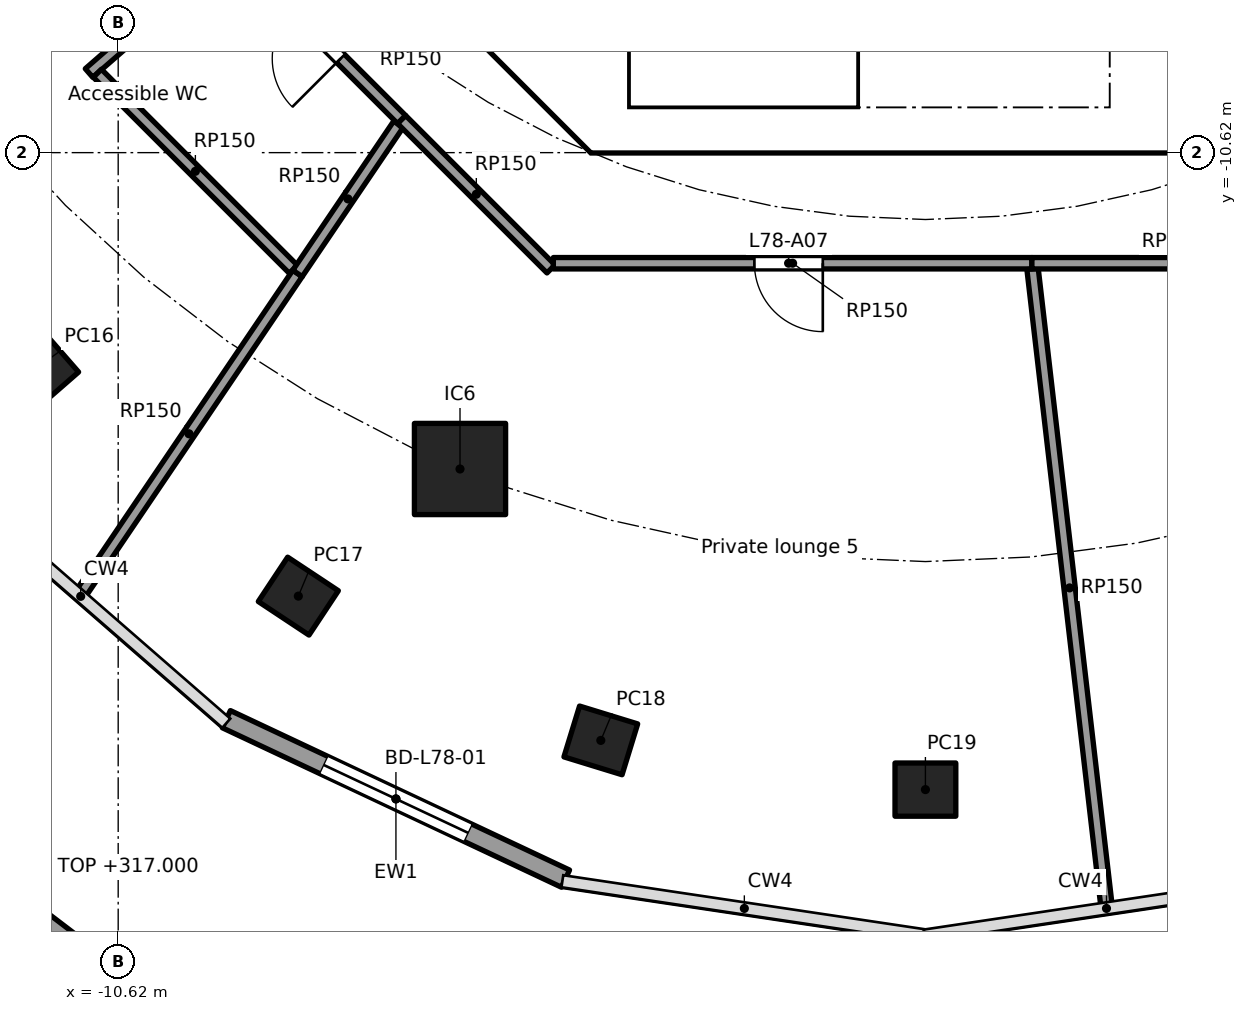
"""IFC4 building model, lengths in metres.
Left out: names, types, materials, properties, quantities, classifications, styles, units other than length and angle.
Written with IfcOpenShell. Run it as: python <this file> out.ifc"""

import sys

from ifc_helpers import new_model, si_unit, direction, frame, frame_2d, origin, origin_2d, place, context, subcontext, project, spatial, polyline, rectangle, hollow_rectangle, outline, extrude, element, fill, save


model = new_model("IFC4")
c1 = context("Model", 3, precision=1e-05, world=origin(), true_north=direction((0.0, 1.0)))
c2 = subcontext(c1, "Body", "Model", "MODEL_VIEW")
j1 = project(units=[si_unit("LENGTHUNIT", "METRE"), si_unit("PLANEANGLEUNIT", "RADIAN")], contexts=[c1])
p1 = place(None, origin())
s1 = spatial("IfcSite", under=j1, at=p1, CompositionType="ELEMENT")
p2 = place(p1, origin())
s2 = spatial("IfcBuilding", under=s1, at=p2, CompositionType="ELEMENT")
p3 = place(p2, frame((0.0, 0.0, 315.9)))
s3 = spatial("IfcBuildingStorey", under=s2, at=p3, CompositionType="ELEMENT", Elevation=315.9)
for number, where, z_axis, x_axis in (
    (1, (-11.667, -13.435, -0.3), (0.0, 0.0, 1.0), (0.657, -0.754, 0.0)),
    (2, (-8.25, -16.455, -0.3), (0.0, 0.0, 1.0), (0.834, -0.552, 0.0)),
    (3, (-4.271, -18.353, -0.3), (0.0, 0.0, 1.0), (0.956, -0.294, 0.0)),
    (4, (0.0, -19.0, -0.3), (0.0, 0.0, 1.0), (1.0, 0.0, 0.0)),
):
    element("IfcColumn", number, at=place(p3, frame(where, z_axis=z_axis, x_axis=x_axis)), inside=s3, PredefinedType="COLUMN", context=c2, shape_type="SweptSolid", body=[
        extrude(hollow_rectangle(XDim=0.8, YDim=0.7, WallThickness=0.025, at=origin_2d()), origin(), (0.0, 0.0, 1.0), 4.8),
    ])
p4 = place(p3, frame((-6.123, -14.782, 0.0), z_axis=(0.0, 0.0, 1.0), x_axis=(1.0, 0.0, 0.0)))
e5 = element("IfcColumn", 5, at=p4, inside=s3, PredefinedType="COLUMN", context=c2, shape_type="SweptSolid", body=[
    extrude(rectangle(XDim=1.2, YDim=1.2, at=origin_2d()), origin(), (0.0, 0.0, 1.0), 4.5),
])
p5 = place(p3, frame((-4.735, -20.171, 0.0), z_axis=(0.0, 0.0, 1.0), x_axis=(-0.904961168887, 0.425494163069, 0.0)))
e6 = element("IfcWall", 6, at=p5, inside=s3, PredefinedType="SOLIDWALL", context=c2, shape_type="SweptSolid", body=[
    extrude(rectangle(XDim=4.93, YDim=0.25, at=frame_2d((2.465, 0.0))), origin(), (0.0, 0.0, 1.0), 4.2),
])
p6 = place(p5, frame((1.415, 0.0, 0.0)))
e7 = element("IfcOpeningElement", 7, at=p6, cuts=e6, PredefinedType="OPENING", context=c2, shape_type="SweptSolid", body=[
    extrude(rectangle(XDim=2.1, YDim=2.4, at=frame_2d((1.05, 1.2))), frame((0.0, 0.135, 0.0), z_axis=(0.0, -1.0, 0.0), x_axis=(1.0, 0.0, 0.0)), (0.0, 0.0, 1.0), 0.27),
])
p7 = place(p3, frame((-9.073, -23.515, 0.0), z_axis=(0.0, 0.0, 1.0), x_axis=(-0.795536400327, 0.605905797756, 0.0)))
e8 = element("IfcWall", 8, at=p7, inside=s3, PredefinedType="SOLIDWALL", context=c2, shape_type="SweptSolid", body=[
    extrude(rectangle(XDim=7.387, YDim=1.6, at=frame_2d((3.694, 0.0))), origin(), (0.0, 0.0, 1.0), 1.1),
])
p8 = place(p3, frame((-9.988, -4.613, 0.0), z_axis=(0.0, 0.0, 1.0), x_axis=(0.707106781187, -0.707106781187, 0.0)))
e9 = element("IfcWall", 9, at=p8, inside=s3, PredefinedType="SHEAR", context=c2, shape_type="SweptSolid", body=[
    extrude(rectangle(XDim=7.602, YDim=0.6, at=frame_2d((3.801, 0.0))), origin(), (0.0, 0.0, 1.0), 4.2),
])
p9 = place(p8, frame((6.151, 0.0, 0.0)))
e10 = element("IfcOpeningElement", 10, at=p9, cuts=e9, PredefinedType="OPENING", context=c2, shape_type="SweptSolid", body=[
    extrude(rectangle(XDim=1.1, YDim=2.1, at=frame_2d((0.55, 1.05))), frame((0.0, 0.31, 0.0), z_axis=(0.0, -1.0, 0.0), x_axis=(1.0, 0.0, 0.0)), (0.0, 0.0, 1.0), 0.62),
])
p10 = place(p3, origin())
e11 = element("IfcWall", 11, at=p10, inside=s3, PredefinedType="SHEAR", context=c2, shape_type="SweptSolid", body=[
    extrude(outline(polyline([(-4.152, -10.025), (4.152, -10.025), (4.401, -9.776), (4.825, -10.2), (4.401, -10.625), (-4.401, -10.625), (-4.825, -10.2), (-4.401, -9.776), (-4.152, -10.025)])), origin(), (0.0, 0.0, 1.0), 4.2),
])
p11 = place(p3, origin())
e12 = element("IfcWall", 12, at=p11, inside=s3, PredefinedType="SOLIDWALL", context=c2, shape_type="SweptSolid", body=[
    extrude(outline(polyline([(-3.9, -10.025), (-4.1, -10.025), (-4.1, -7.025), (-3.9, -7.025), (-3.9, -10.025)])), origin(), (0.0, 0.0, 1.0), 4.2),
])
p12 = place(p3, frame((-11.004, -9.572, 0.0), z_axis=(0.0, 0.0, 1.0), x_axis=(0.754472226649, 0.65633197333, 0.0)))
e13 = element("IfcWall", 13, at=p12, inside=s3, PredefinedType="PARTITIONING", context=c2, shape_type="SweptSolid", body=[
    extrude(rectangle(XDim=2.406, YDim=0.15, at=frame_2d((1.203, 0.0))), origin(), (0.0, 0.0, 1.0), 4.2),
])
p13 = place(p3, frame((-8.315, -12.155, 0.0), z_axis=(0.0, 0.0, 1.0), x_axis=(-0.707106781187, 0.707106781187, 0.0)))
e14 = element("IfcWall", 14, at=p13, inside=s3, PredefinedType="PARTITIONING", context=c2, shape_type="SweptSolid", body=[
    extrude(rectangle(XDim=3.647, YDim=0.15, at=frame_2d((1.823, 0.0))), origin(), (0.0, 0.0, 1.0), 4.2),
])
p14 = place(p3, frame((-8.261, -12.209, 0.0), z_axis=(0.0, 0.0, 1.0), x_axis=(-0.560426361266, -0.82820425838, 0.0)))
e15 = element("IfcWall", 15, at=p14, inside=s3, PredefinedType="PARTITIONING", context=c2, shape_type="SweptSolid", body=[
    extrude(rectangle(XDim=5.095, YDim=0.15, at=frame_2d((2.547, 0.0))), origin(), (0.0, 0.0, 1.0), 4.2),
])
p15 = place(p3, frame((-6.891, -10.185, 0.0), z_axis=(0.0, 0.0, 1.0), x_axis=(-0.707106781187, 0.707106781187, 0.0)))
e16 = element("IfcWall", 16, at=p15, inside=s3, PredefinedType="PARTITIONING", context=c2, shape_type="SweptSolid", body=[
    extrude(rectangle(XDim=3.169, YDim=0.15, at=frame_2d((1.584, 0.0))), origin(), (0.0, 0.0, 1.0), 4.2),
])
p16 = place(p15, frame((1.135, 0.0, 0.0)))
e17 = element("IfcOpeningElement", 17, at=p16, cuts=e16, PredefinedType="OPENING", context=c2, shape_type="SweptSolid", body=[
    extrude(rectangle(XDim=0.9, YDim=2.1, at=frame_2d((0.45, 1.05))), frame((0.0, 0.085, 0.0), z_axis=(0.0, -1.0, 0.0), x_axis=(1.0, 0.0, 0.0)), (0.0, 0.0, 1.0), 0.17),
])
p17 = place(p3, frame((-6.934, -10.248, 0.0), z_axis=(0.0, 0.0, 1.0), x_axis=(-0.560540301995, -0.828127145938, 0.0)))
e18 = element("IfcWall", 18, at=p17, inside=s3, PredefinedType="PARTITIONING", context=c2, shape_type="SweptSolid", body=[
    extrude(rectangle(XDim=2.368, YDim=0.15, at=frame_2d((1.184, 0.0))), origin(), (0.0, 0.0, 1.0), 4.2),
])
p18 = place(p3, frame((-4.926, -12.15, 0.0), z_axis=(0.0, 0.0, 1.0), x_axis=(-0.707150707683, 0.707062851961, 0.0)))
e19 = element("IfcWall", 19, at=p18, inside=s3, PredefinedType="PARTITIONING", context=c2, shape_type="SweptSolid", body=[
    extrude(rectangle(XDim=2.779, YDim=0.15, at=frame_2d((1.389, 0.0))), origin(), (0.0, 0.0, 1.0), 4.2),
])
p19 = place(p3, frame((1.401, -12.075, 0.0), z_axis=(0.0, 0.0, 1.0), x_axis=(-1.0, 0.0, 0.0)))
e20 = element("IfcWall", 20, at=p19, inside=s3, PredefinedType="PARTITIONING", context=c2, shape_type="SweptSolid", body=[
    extrude(rectangle(XDim=6.296, YDim=0.15, at=frame_2d((3.148, 0.0))), origin(), (0.0, 0.0, 1.0), 4.2),
])
p20 = place(p19, frame((2.751, 0.0, 0.0)))
e21 = element("IfcOpeningElement", 21, at=p20, cuts=e20, PredefinedType="OPENING", context=c2, shape_type="SweptSolid", body=[
    extrude(rectangle(XDim=0.9, YDim=2.1, at=frame_2d((0.45, 1.05))), frame((0.0, 0.085, 0.0), z_axis=(0.0, -1.0, 0.0), x_axis=(1.0, 0.0, 0.0)), (0.0, 0.0, 1.0), 0.17),
])
p21 = place(p3, frame((1.41, -12.15, 0.0), z_axis=(0.0, 0.0, 1.0), x_axis=(0.115263493726, -0.993334952075, 0.0)))
e22 = element("IfcWall", 22, at=p21, inside=s3, PredefinedType="PARTITIONING", context=c2, shape_type="SweptSolid", body=[
    extrude(rectangle(XDim=8.449, YDim=0.15, at=frame_2d((4.225, 0.0))), origin(), (0.0, 0.0, 1.0), 4.2),
])
p22 = place(p3, frame((5.108, -12.075, 0.0), z_axis=(0.0, 0.0, 1.0), x_axis=(-1.0, 0.0, 0.0)))
e23 = element("IfcWall", 23, at=p22, inside=s3, PredefinedType="PARTITIONING", context=c2, shape_type="SweptSolid", body=[
    extrude(rectangle(XDim=3.707, YDim=0.15, at=frame_2d((1.854, 0.0))), origin(), (0.0, 0.0, 1.0), 4.2),
])
p23 = place(p6, origin())
e24 = element("IfcDoor", 24, at=p23, inside=s3, OperationType="SLIDING_TO_LEFT", PredefinedType="DOOR", context=c2, shape_type="SweptSolid", body=[
    extrude(rectangle(XDim=2.1, YDim=2.4, at=frame_2d((1.05, 1.2))), frame((0.0, 0.025, 0.0), z_axis=(0.0, -1.0, 0.0), x_axis=(1.0, 0.0, 0.0)), (0.0, 0.0, 1.0), 0.05),
])
fill(e7, e24)
p24 = place(p9, origin())
e25 = element("IfcDoor", 25, at=p24, inside=s3, OperationType="SINGLE_SWING_LEFT", PredefinedType="DOOR", context=c2, shape_type="SweptSolid", body=[
    extrude(rectangle(XDim=1.1, YDim=2.1, at=frame_2d((0.55, 1.05))), frame((0.0, 0.025, 0.0), z_axis=(0.0, -1.0, 0.0), x_axis=(1.0, 0.0, 0.0)), (0.0, 0.0, 1.0), 0.05),
])
fill(e10, e25)
p25 = place(p16, origin())
e26 = element("IfcDoor", 26, at=p25, inside=s3, OperationType="SINGLE_SWING_LEFT", PredefinedType="DOOR", context=c2, shape_type="SweptSolid", body=[
    extrude(rectangle(XDim=0.9, YDim=2.1, at=frame_2d((0.45, 1.05))), frame((0.0, 0.025, 0.0), z_axis=(0.0, -1.0, 0.0), x_axis=(1.0, 0.0, 0.0)), (0.0, 0.0, 1.0), 0.05),
])
fill(e17, e26)
p26 = place(p20, origin())
e27 = element("IfcDoor", 27, at=p26, inside=s3, OperationType="SINGLE_SWING_LEFT", PredefinedType="DOOR", context=c2, shape_type="SweptSolid", body=[
    extrude(rectangle(XDim=0.9, YDim=2.1, at=frame_2d((0.45, 1.05))), frame((0.0, 0.025, 0.0), z_axis=(0.0, -1.0, 0.0), x_axis=(1.0, 0.0, 0.0)), (0.0, 0.0, 1.0), 0.05),
])
fill(e21, e27)
save(model, sys.argv[1])
